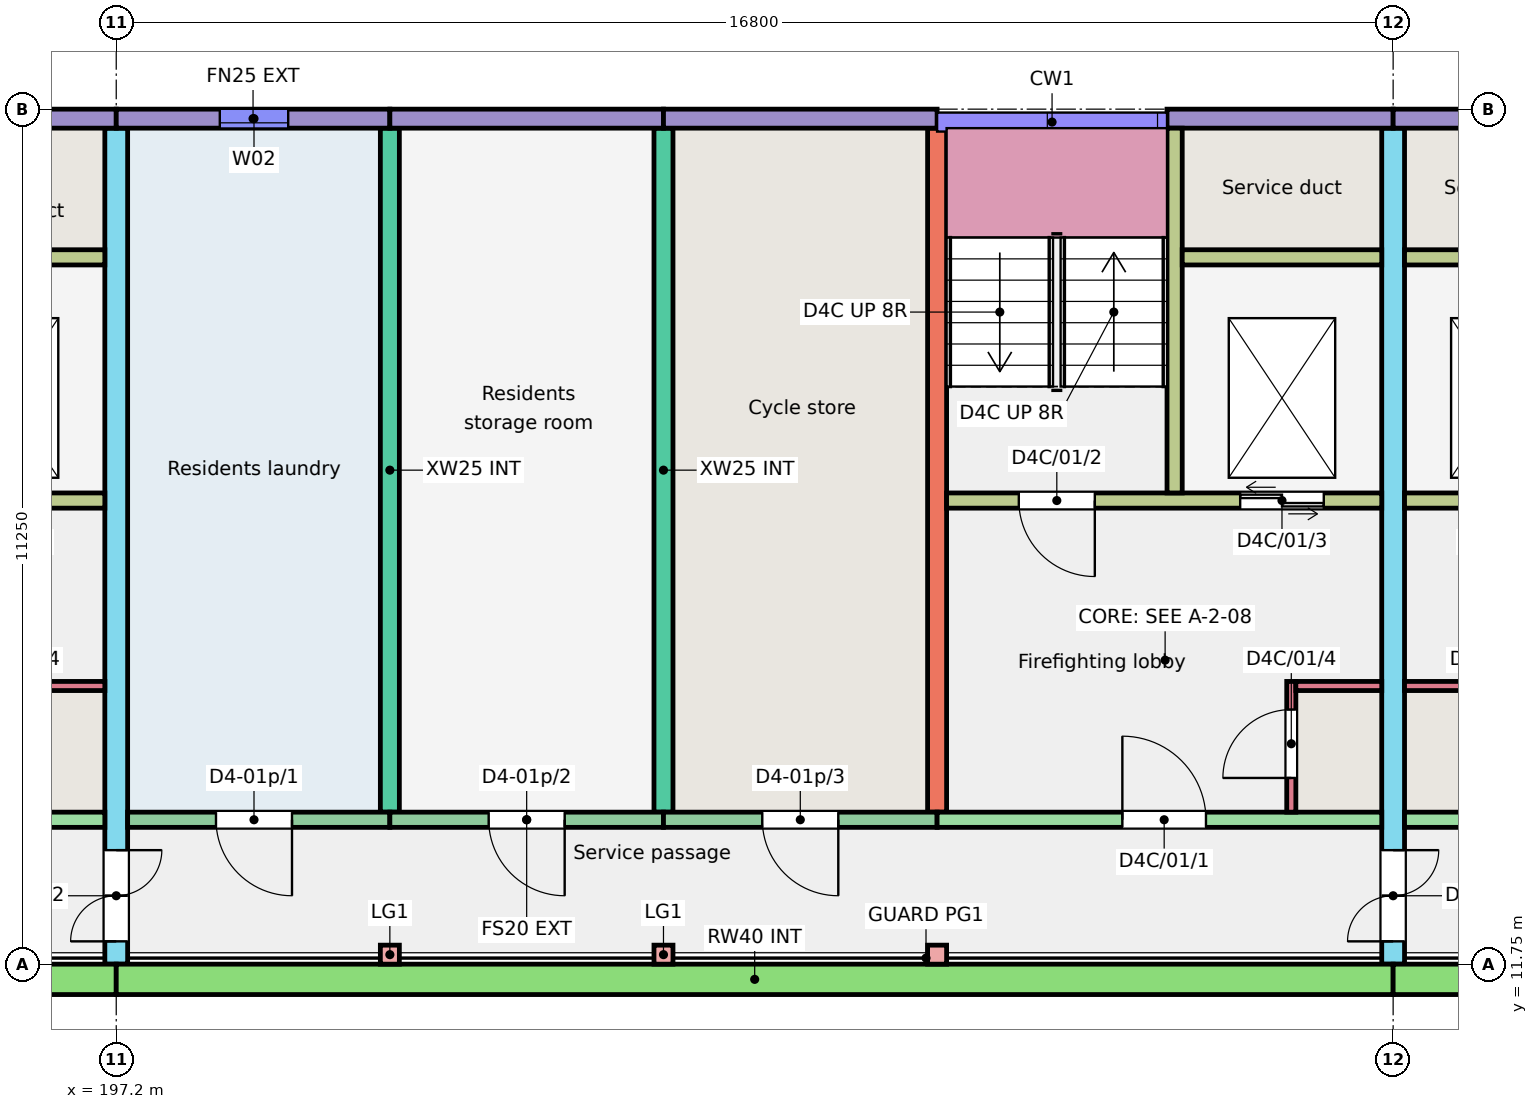
"""IFC4 building model, lengths in metres.
Left out: names, types, materials, properties, quantities, classifications, styles, units other than length and angle.
Written with IfcOpenShell. Run it as: python <this file> out.ifc"""

import sys

from ifc_helpers import new_model, si_unit, direction, frame, frame_2d, origin, origin_2d, place, context, subcontext, project, spatial, rectangle, extrude, element, fill, save


model = new_model("IFC4")
c1 = context("Model", 3, precision=1e-05, world=origin(), true_north=direction((0.0, 1.0)))
c2 = subcontext(c1, "Body", "Model", "MODEL_VIEW")
j1 = project(units=[si_unit("LENGTHUNIT", "METRE"), si_unit("PLANEANGLEUNIT", "RADIAN")], contexts=[c1])
p1 = place(None, origin())
s1 = spatial("IfcSite", under=j1, at=p1, CompositionType="ELEMENT")
p2 = place(p1, origin())
s2 = spatial("IfcBuilding", under=s1, at=p2, CompositionType="ELEMENT")
p3 = place(p2, frame((0.0, 0.0, 3.0)))
s3 = spatial("IfcBuildingStorey", under=s2, at=p3, CompositionType="ELEMENT", Elevation=3.0)
p4 = place(p3, frame((197.2, 11.75, 0.0), z_axis=(0.0, 0.0, 1.0), x_axis=(0.0, 1.0, 0.0)))
e1 = element("IfcWall", 1, at=p4, inside=s3, PredefinedType="SHEAR", context=c2, shape_type="SweptSolid", body=[
    extrude(rectangle(XDim=11.0, YDim=0.3, at=frame_2d((5.5, 0.0))), origin(), (0.0, 0.0, 1.0), 3.0),
])
p5 = place(p4, frame((0.3, 0.0, 0.0)))
e2 = element("IfcOpeningElement", 2, at=p5, cuts=e1, PredefinedType="OPENING", context=c2, shape_type="SweptSolid", body=[
    extrude(rectangle(XDim=1.2, YDim=2.1, at=frame_2d((0.6, 1.05))), frame((0.0, 0.16, 0.0), z_axis=(0.0, -1.0, 0.0), x_axis=(1.0, 0.0, 0.0)), (0.0, 0.0, 1.0), 0.32),
])
for number, where, z_axis, x_axis in (
    (3, (200.8, 13.75, 0.0), (0.0, 0.0, 1.0), (0.0, 1.0, 0.0)),
    (4, (204.4, 13.75, 0.0), (0.0, 0.0, 1.0), (0.0, 1.0, 0.0)),
    (5, (208.0, 13.75, 0.0), (0.0, 0.0, 1.0), (0.0, 1.0, 0.0)),
):
    element("IfcWall", number, at=place(p3, frame(where, z_axis=z_axis, x_axis=x_axis)), inside=s3, PredefinedType="SHEAR", context=c2, shape_type="SweptSolid", body=[
        extrude(rectangle(XDim=9.0, YDim=0.25, at=frame_2d((4.5, 0.0))), origin(), (0.0, 0.0, 1.0), 3.0),
    ])
p6 = place(p3, frame((214.0, 11.75, 0.0), z_axis=(0.0, 0.0, 1.0), x_axis=(0.0, 1.0, 0.0)))
e6 = element("IfcWall", 6, at=p6, inside=s3, PredefinedType="SHEAR", context=c2, shape_type="SweptSolid", body=[
    extrude(rectangle(XDim=11.0, YDim=0.3, at=frame_2d((5.5, 0.0))), origin(), (0.0, 0.0, 1.0), 3.0),
])
p7 = place(p6, frame((0.3, 0.0, 0.0)))
e7 = element("IfcOpeningElement", 7, at=p7, cuts=e6, PredefinedType="OPENING", context=c2, shape_type="SweptSolid", body=[
    extrude(rectangle(XDim=1.2, YDim=2.1, at=frame_2d((0.6, 1.05))), frame((0.0, 0.16, 0.0), z_axis=(0.0, -1.0, 0.0), x_axis=(1.0, 0.0, 0.0)), (0.0, 0.0, 1.0), 0.32),
])
p8 = place(p3, frame((194.225, 22.875, 0.0), z_axis=(0.0, 0.0, 1.0), x_axis=(1.0, 0.0, 0.0)))
e8 = element("IfcWall", 8, at=p8, inside=s3, PredefinedType="SOLIDWALL", context=c2, shape_type="SweptSolid", body=[
    extrude(rectangle(XDim=2.975, YDim=0.25, at=frame_2d((1.487, 0.0))), origin(), (0.0, 0.0, 1.0), 3.0),
])
p9 = place(p3, frame((191.2, 13.65, 0.0), z_axis=(0.0, 0.0, 1.0), x_axis=(1.0, 0.0, 0.0)))
e9 = element("IfcWall", 9, at=p9, inside=s3, PredefinedType="SHEAR", context=c2, shape_type="SweptSolid", body=[
    extrude(rectangle(XDim=5.85, YDim=0.2, at=frame_2d((2.925, 0.0))), origin(), (0.0, 0.0, 1.0), 3.0),
])
p10 = place(p9, frame((2.438, 0.0, 0.0)))
e10 = element("IfcOpeningElement", 10, at=p10, cuts=e9, PredefinedType="OPENING", context=c2, shape_type="SweptSolid", body=[
    extrude(rectangle(XDim=1.1, YDim=2.1, at=frame_2d((0.55, 1.05))), frame((0.0, 0.11, 0.0), z_axis=(0.0, -1.0, 0.0), x_axis=(1.0, 0.0, 0.0)), (0.0, 0.0, 1.0), 0.22),
])
p11 = place(p3, frame((191.325, 17.85, 0.0), z_axis=(0.0, 0.0, 1.0), x_axis=(1.0, 0.0, 0.0)))
e11 = element("IfcWall", 11, at=p11, inside=s3, PredefinedType="SHEAR", context=c2, shape_type="SweptSolid", body=[
    extrude(rectangle(XDim=5.725, YDim=0.2, at=frame_2d((2.863, 0.0))), origin(), (0.0, 0.0, 1.0), 3.0),
])
p12 = place(p11, frame((0.95, 0.0, 0.0)))
e12 = element("IfcOpeningElement", 12, at=p12, cuts=e11, PredefinedType="OPENING", context=c2, shape_type="SweptSolid", body=[
    extrude(rectangle(XDim=1.0, YDim=2.1, at=frame_2d((0.5, 1.05))), frame((0.0, 0.11, 0.0), z_axis=(0.0, -1.0, 0.0), x_axis=(1.0, 0.0, 0.0)), (0.0, 0.0, 1.0), 0.22),
])
p13 = place(p11, frame((3.863, 0.0, 0.0)))
e13 = element("IfcOpeningElement", 13, at=p13, cuts=e11, PredefinedType="OPENING", context=c2, shape_type="SweptSolid", body=[
    extrude(rectangle(XDim=1.1, YDim=2.1, at=frame_2d((0.55, 1.05))), frame((0.0, 0.11, 0.0), z_axis=(0.0, -1.0, 0.0), x_axis=(1.0, 0.0, 0.0)), (0.0, 0.0, 1.0), 0.22),
])
p14 = place(p3, frame((194.425, 21.05, 0.0), z_axis=(0.0, 0.0, 1.0), x_axis=(1.0, 0.0, 0.0)))
e14 = element("IfcWall", 14, at=p14, inside=s3, PredefinedType="SHEAR", context=c2, shape_type="SweptSolid", body=[
    extrude(rectangle(XDim=2.625, YDim=0.2, at=frame_2d((1.312, 0.0))), origin(), (0.0, 0.0, 1.0), 3.0),
])
p15 = place(p3, frame((195.92, 15.41, 0.0), z_axis=(0.0, 0.0, 1.0), x_axis=(1.0, 0.0, 0.0)))
e15 = element("IfcWall", 15, at=p15, inside=s3, PredefinedType="SHEAR", context=c2, shape_type="SweptSolid", body=[
    extrude(rectangle(XDim=1.13, YDim=0.12, at=frame_2d((0.565, 0.0))), origin(), (0.0, 0.0, 1.0), 3.0),
])
p16 = place(p3, frame((197.2, 22.875, 0.0), z_axis=(0.0, 0.0, 1.0), x_axis=(1.0, 0.0, 0.0)))
e16 = element("IfcWall", 16, at=p16, inside=s3, PredefinedType="SOLIDWALL", context=c2, shape_type="SweptSolid", body=[
    extrude(rectangle(XDim=3.6, YDim=0.25, at=frame_2d((1.8, 0.0))), origin(), (0.0, 0.0, 1.0), 3.0),
])
p17 = place(p16, frame((1.363, 0.0, 1.8)))
e17 = element("IfcOpeningElement", 17, at=p17, cuts=e16, PredefinedType="OPENING", context=c2, shape_type="SweptSolid", body=[
    extrude(rectangle(XDim=0.9, YDim=0.6, at=frame_2d((0.45, 0.3))), frame((0.0, 0.135, 0.0), z_axis=(0.0, -1.0, 0.0), x_axis=(1.0, 0.0, 0.0)), (0.0, 0.0, 1.0), 0.27),
])
p18 = place(p3, frame((197.35, 13.65, 0.0), z_axis=(0.0, 0.0, 1.0), x_axis=(1.0, 0.0, 0.0)))
e18 = element("IfcWall", 18, at=p18, inside=s3, PredefinedType="SOLIDWALL", context=c2, shape_type="SweptSolid", body=[
    extrude(rectangle(XDim=3.45, YDim=0.2, at=frame_2d((1.725, 0.0))), origin(), (0.0, 0.0, 1.0), 3.0),
])
p19 = place(p18, frame((1.163, 0.0, 0.0)))
e19 = element("IfcOpeningElement", 19, at=p19, cuts=e18, PredefinedType="OPENING", context=c2, shape_type="SweptSolid", body=[
    extrude(rectangle(XDim=1.0, YDim=2.1, at=frame_2d((0.5, 1.05))), frame((0.0, 0.11, 0.0), z_axis=(0.0, -1.0, 0.0), x_axis=(1.0, 0.0, 0.0)), (0.0, 0.0, 1.0), 0.22),
])
p20 = place(p3, frame((200.8, 22.875, 0.0), z_axis=(0.0, 0.0, 1.0), x_axis=(1.0, 0.0, 0.0)))
e20 = element("IfcWall", 20, at=p20, inside=s3, PredefinedType="SOLIDWALL", context=c2, shape_type="SweptSolid", body=[
    extrude(rectangle(XDim=3.6, YDim=0.25, at=frame_2d((1.8, 0.0))), origin(), (0.0, 0.0, 1.0), 3.0),
])
p21 = place(p3, frame((200.8, 13.65, 0.0), z_axis=(0.0, 0.0, 1.0), x_axis=(1.0, 0.0, 0.0)))
e21 = element("IfcWall", 21, at=p21, inside=s3, PredefinedType="SOLIDWALL", context=c2, shape_type="SweptSolid", body=[
    extrude(rectangle(XDim=3.6, YDim=0.2, at=frame_2d((1.8, 0.0))), origin(), (0.0, 0.0, 1.0), 3.0),
])
p22 = place(p21, frame((1.3, 0.0, 0.0)))
e22 = element("IfcOpeningElement", 22, at=p22, cuts=e21, PredefinedType="OPENING", context=c2, shape_type="SweptSolid", body=[
    extrude(rectangle(XDim=1.0, YDim=2.1, at=frame_2d((0.5, 1.05))), frame((0.0, 0.11, 0.0), z_axis=(0.0, -1.0, 0.0), x_axis=(1.0, 0.0, 0.0)), (0.0, 0.0, 1.0), 0.22),
])
p23 = place(p3, frame((204.4, 22.875, 0.0), z_axis=(0.0, 0.0, 1.0), x_axis=(1.0, 0.0, 0.0)))
e23 = element("IfcWall", 23, at=p23, inside=s3, PredefinedType="SOLIDWALL", context=c2, shape_type="SweptSolid", body=[
    extrude(rectangle(XDim=3.6, YDim=0.25, at=frame_2d((1.8, 0.0))), origin(), (0.0, 0.0, 1.0), 3.0),
])
p24 = place(p3, frame((204.4, 13.65, 0.0), z_axis=(0.0, 0.0, 1.0), x_axis=(1.0, 0.0, 0.0)))
e24 = element("IfcWall", 24, at=p24, inside=s3, PredefinedType="SOLIDWALL", context=c2, shape_type="SweptSolid", body=[
    extrude(rectangle(XDim=3.6, YDim=0.2, at=frame_2d((1.8, 0.0))), origin(), (0.0, 0.0, 1.0), 3.0),
])
p25 = place(p24, frame((1.3, 0.0, 0.0)))
e25 = element("IfcOpeningElement", 25, at=p25, cuts=e24, PredefinedType="OPENING", context=c2, shape_type="SweptSolid", body=[
    extrude(rectangle(XDim=1.0, YDim=2.1, at=frame_2d((0.5, 1.05))), frame((0.0, 0.11, 0.0), z_axis=(0.0, -1.0, 0.0), x_axis=(1.0, 0.0, 0.0)), (0.0, 0.0, 1.0), 0.22),
])
p26 = place(p3, frame((211.025, 22.875, 0.0), z_axis=(0.0, 0.0, 1.0), x_axis=(1.0, 0.0, 0.0)))
e26 = element("IfcWall", 26, at=p26, inside=s3, PredefinedType="SOLIDWALL", context=c2, shape_type="SweptSolid", body=[
    extrude(rectangle(XDim=2.975, YDim=0.25, at=frame_2d((1.488, 0.0))), origin(), (0.0, 0.0, 1.0), 3.0),
])
p27 = place(p3, frame((208.0, 13.65, 0.0), z_axis=(0.0, 0.0, 1.0), x_axis=(1.0, 0.0, 0.0)))
e27 = element("IfcWall", 27, at=p27, inside=s3, PredefinedType="SHEAR", context=c2, shape_type="SweptSolid", body=[
    extrude(rectangle(XDim=5.85, YDim=0.2, at=frame_2d((2.925, 0.0))), origin(), (0.0, 0.0, 1.0), 3.0),
])
p28 = place(p27, frame((2.438, 0.0, 0.0)))
e28 = element("IfcOpeningElement", 28, at=p28, cuts=e27, PredefinedType="OPENING", context=c2, shape_type="SweptSolid", body=[
    extrude(rectangle(XDim=1.1, YDim=2.1, at=frame_2d((0.55, 1.05))), frame((0.0, 0.11, 0.0), z_axis=(0.0, -1.0, 0.0), x_axis=(1.0, 0.0, 0.0)), (0.0, 0.0, 1.0), 0.22),
])
p29 = place(p3, frame((208.125, 17.85, 0.0), z_axis=(0.0, 0.0, 1.0), x_axis=(1.0, 0.0, 0.0)))
e29 = element("IfcWall", 29, at=p29, inside=s3, PredefinedType="SHEAR", context=c2, shape_type="SweptSolid", body=[
    extrude(rectangle(XDim=5.725, YDim=0.2, at=frame_2d((2.863, 0.0))), origin(), (0.0, 0.0, 1.0), 3.0),
])
p30 = place(p29, frame((0.95, 0.0, 0.0)))
e30 = element("IfcOpeningElement", 30, at=p30, cuts=e29, PredefinedType="OPENING", context=c2, shape_type="SweptSolid", body=[
    extrude(rectangle(XDim=1.0, YDim=2.1, at=frame_2d((0.5, 1.05))), frame((0.0, 0.11, 0.0), z_axis=(0.0, -1.0, 0.0), x_axis=(1.0, 0.0, 0.0)), (0.0, 0.0, 1.0), 0.22),
])
p31 = place(p29, frame((3.863, 0.0, 0.0)))
e31 = element("IfcOpeningElement", 31, at=p31, cuts=e29, PredefinedType="OPENING", context=c2, shape_type="SweptSolid", body=[
    extrude(rectangle(XDim=1.1, YDim=2.1, at=frame_2d((0.55, 1.05))), frame((0.0, 0.11, 0.0), z_axis=(0.0, -1.0, 0.0), x_axis=(1.0, 0.0, 0.0)), (0.0, 0.0, 1.0), 0.22),
])
p32 = place(p3, frame((211.125, 17.95, 0.0), z_axis=(0.0, 0.0, 1.0), x_axis=(0.0, 1.0, 0.0)))
e32 = element("IfcWall", 32, at=p32, inside=s3, PredefinedType="SHEAR", context=c2, shape_type="SweptSolid", body=[
    extrude(rectangle(XDim=4.8, YDim=0.2, at=frame_2d((2.4, 0.0))), origin(), (0.0, 0.0, 1.0), 3.0),
])
p33 = place(p3, frame((211.225, 21.05, 0.0), z_axis=(0.0, 0.0, 1.0), x_axis=(1.0, 0.0, 0.0)))
e33 = element("IfcWall", 33, at=p33, inside=s3, PredefinedType="SHEAR", context=c2, shape_type="SweptSolid", body=[
    extrude(rectangle(XDim=2.625, YDim=0.2, at=frame_2d((1.312, 0.0))), origin(), (0.0, 0.0, 1.0), 3.0),
])
p34 = place(p3, frame((212.66, 13.75, 0.0), z_axis=(0.0, 0.0, 1.0), x_axis=(0.0, 1.0, 0.0)))
e34 = element("IfcWall", 34, at=p34, inside=s3, PredefinedType="SHEAR", context=c2, shape_type="SweptSolid", body=[
    extrude(rectangle(XDim=1.72, YDim=0.12, at=frame_2d((0.86, 0.0))), origin(), (0.0, 0.0, 1.0), 3.0),
])
p35 = place(p34, frame((0.45, 0.0, 0.0)))
e35 = element("IfcOpeningElement", 35, at=p35, cuts=e34, PredefinedType="OPENING", context=c2, shape_type="SweptSolid", body=[
    extrude(rectangle(XDim=0.9, YDim=2.1, at=frame_2d((0.45, 1.05))), frame((0.0, 0.07, 0.0), z_axis=(0.0, -1.0, 0.0), x_axis=(1.0, 0.0, 0.0)), (0.0, 0.0, 1.0), 0.14),
])
p36 = place(p3, frame((212.72, 15.41, 0.0), z_axis=(0.0, 0.0, 1.0), x_axis=(1.0, 0.0, 0.0)))
e36 = element("IfcWall", 36, at=p36, inside=s3, PredefinedType="SHEAR", context=c2, shape_type="SweptSolid", body=[
    extrude(rectangle(XDim=1.13, YDim=0.12, at=frame_2d((0.565, 0.0))), origin(), (0.0, 0.0, 1.0), 3.0),
])
p37 = place(p3, frame((214.0, 22.875, 0.0), z_axis=(0.0, 0.0, 1.0), x_axis=(1.0, 0.0, 0.0)))
e37 = element("IfcWall", 37, at=p37, inside=s3, PredefinedType="SOLIDWALL", context=c2, shape_type="SweptSolid", body=[
    extrude(rectangle(XDim=2.975, YDim=0.25, at=frame_2d((1.488, 0.0))), origin(), (0.0, 0.0, 1.0), 3.0),
])
p38 = place(p3, frame((214.15, 13.65, 0.0), z_axis=(0.0, 0.0, 1.0), x_axis=(1.0, 0.0, 0.0)))
e38 = element("IfcWall", 38, at=p38, inside=s3, PredefinedType="SHEAR", context=c2, shape_type="SweptSolid", body=[
    extrude(rectangle(XDim=5.85, YDim=0.2, at=frame_2d((2.925, 0.0))), origin(), (0.0, 0.0, 1.0), 3.0),
])
p39 = place(p38, frame((2.312, 0.0, 0.0)))
e39 = element("IfcOpeningElement", 39, at=p39, cuts=e38, PredefinedType="OPENING", context=c2, shape_type="SweptSolid", body=[
    extrude(rectangle(XDim=1.1, YDim=2.1, at=frame_2d((0.55, 1.05))), frame((0.0, 0.11, 0.0), z_axis=(0.0, -1.0, 0.0), x_axis=(1.0, 0.0, 0.0)), (0.0, 0.0, 1.0), 0.22),
])
p40 = place(p3, frame((214.15, 17.85, 0.0), z_axis=(0.0, 0.0, 1.0), x_axis=(1.0, 0.0, 0.0)))
e40 = element("IfcWall", 40, at=p40, inside=s3, PredefinedType="SHEAR", context=c2, shape_type="SweptSolid", body=[
    extrude(rectangle(XDim=5.725, YDim=0.2, at=frame_2d((2.863, 0.0))), origin(), (0.0, 0.0, 1.0), 3.0),
])
p41 = place(p40, frame((3.775, 0.0, 0.0)))
e41 = element("IfcOpeningElement", 41, at=p41, cuts=e40, PredefinedType="OPENING", context=c2, shape_type="SweptSolid", body=[
    extrude(rectangle(XDim=1.0, YDim=2.1, at=frame_2d((0.5, 1.05))), frame((0.0, 0.11, 0.0), z_axis=(0.0, -1.0, 0.0), x_axis=(1.0, 0.0, 0.0)), (0.0, 0.0, 1.0), 0.22),
])
p42 = place(p40, frame((0.762, 0.0, 0.0)))
e42 = element("IfcOpeningElement", 42, at=p42, cuts=e40, PredefinedType="OPENING", context=c2, shape_type="SweptSolid", body=[
    extrude(rectangle(XDim=1.1, YDim=2.1, at=frame_2d((0.55, 1.05))), frame((0.0, 0.11, 0.0), z_axis=(0.0, -1.0, 0.0), x_axis=(1.0, 0.0, 0.0)), (0.0, 0.0, 1.0), 0.22),
])
p43 = place(p3, frame((214.15, 21.05, 0.0), z_axis=(0.0, 0.0, 1.0), x_axis=(1.0, 0.0, 0.0)))
e43 = element("IfcWall", 43, at=p43, inside=s3, PredefinedType="SHEAR", context=c2, shape_type="SweptSolid", body=[
    extrude(rectangle(XDim=2.625, YDim=0.2, at=frame_2d((1.312, 0.0))), origin(), (0.0, 0.0, 1.0), 3.0),
])
p44 = place(p3, frame((214.15, 15.41, 0.0), z_axis=(0.0, 0.0, 1.0), x_axis=(1.0, 0.0, 0.0)))
e44 = element("IfcWall", 44, at=p44, inside=s3, PredefinedType="SHEAR", context=c2, shape_type="SweptSolid", body=[
    extrude(rectangle(XDim=1.13, YDim=0.12, at=frame_2d((0.565, 0.0))), origin(), (0.0, 0.0, 1.0), 3.0),
])
for number, where, z_axis, x_axis in (
    (45, (200.8, 11.875, 0.0), (0.0, 0.0, 1.0), (1.0, 0.0, 0.0)),
    (46, (204.4, 11.875, 0.0), (0.0, 0.0, 1.0), (1.0, 0.0, 0.0)),
    (47, (208.0, 11.875, 0.0), (0.0, 0.0, 1.0), (1.0, 0.0, 0.0)),
):
    element("IfcColumn", number, at=place(p3, frame(where, z_axis=z_axis, x_axis=x_axis)), inside=s3, PredefinedType="COLUMN", context=c2, shape_type="SweptSolid", body=[
        extrude(rectangle(XDim=0.25, YDim=0.25, at=origin_2d()), origin(), (0.0, 0.0, 1.0), 3.0),
    ])
for number, where, z_axis, x_axis in (
    (48, (180.4, 11.55, 0.0), (0.0, 0.0, 1.0), (1.0, 0.0, 0.0)),
    (49, (197.2, 11.55, 0.0), (0.0, 0.0, 1.0), (1.0, 0.0, 0.0)),
    (50, (214.0, 11.55, 0.0), (0.0, 0.0, 1.0), (1.0, 0.0, 0.0)),
):
    element("IfcWall", number, at=place(p3, frame(where, z_axis=z_axis, x_axis=x_axis)), inside=s3, PredefinedType="SOLIDWALL", context=c2, shape_type="SweptSolid", body=[
        extrude(rectangle(XDim=16.8, YDim=0.4, at=frame_2d((8.4, 0.0))), origin(), (0.0, 0.0, 1.0), 2.85),
    ])
p45 = place(p17, origin())
e51 = element("IfcWindow", 51, at=p45, inside=s3, PartitioningType="SINGLE_PANEL", PredefinedType="WINDOW", context=c2, shape_type="SweptSolid", body=[
    extrude(rectangle(XDim=0.9, YDim=0.6, at=frame_2d((0.45, 0.3))), frame((0.0, -0.025, 0.0), z_axis=(0.0, -1.0, 0.0), x_axis=(1.0, 0.0, 0.0)), (0.0, 0.0, 1.0), 0.06),
])
fill(e17, e51)
p46 = place(p19, origin())
e52 = element("IfcDoor", 52, at=p46, inside=s3, OperationType="SINGLE_SWING_RIGHT", PredefinedType="DOOR", context=c2, shape_type="SweptSolid", body=[
    extrude(rectangle(XDim=1.0, YDim=2.1, at=frame_2d((0.5, 1.05))), frame((0.0, 0.025, 0.0), z_axis=(0.0, -1.0, 0.0), x_axis=(1.0, 0.0, 0.0)), (0.0, 0.0, 1.0), 0.05),
])
fill(e19, e52)
p47 = place(p22, origin())
e53 = element("IfcDoor", 53, at=p47, inside=s3, OperationType="SINGLE_SWING_RIGHT", PredefinedType="DOOR", context=c2, shape_type="SweptSolid", body=[
    extrude(rectangle(XDim=1.0, YDim=2.1, at=frame_2d((0.5, 1.05))), frame((0.0, 0.025, 0.0), z_axis=(0.0, -1.0, 0.0), x_axis=(1.0, 0.0, 0.0)), (0.0, 0.0, 1.0), 0.05),
])
fill(e22, e53)
p48 = place(p25, origin())
e54 = element("IfcDoor", 54, at=p48, inside=s3, OperationType="SINGLE_SWING_RIGHT", PredefinedType="DOOR", context=c2, shape_type="SweptSolid", body=[
    extrude(rectangle(XDim=1.0, YDim=2.1, at=frame_2d((0.5, 1.05))), frame((0.0, 0.025, 0.0), z_axis=(0.0, -1.0, 0.0), x_axis=(1.0, 0.0, 0.0)), (0.0, 0.0, 1.0), 0.05),
])
fill(e25, e54)
p49 = place(p28, origin())
e55 = element("IfcDoor", 55, at=p49, inside=s3, OperationType="SINGLE_SWING_LEFT", PredefinedType="DOOR", context=c2, shape_type="SweptSolid", body=[
    extrude(rectangle(XDim=1.1, YDim=2.1, at=frame_2d((0.55, 1.05))), frame((0.0, 0.025, 0.0), z_axis=(0.0, -1.0, 0.0), x_axis=(1.0, 0.0, 0.0)), (0.0, 0.0, 1.0), 0.05),
])
fill(e28, e55)
p50 = place(p30, origin())
e56 = element("IfcDoor", 56, at=p50, inside=s3, OperationType="SINGLE_SWING_RIGHT", PredefinedType="DOOR", context=c2, shape_type="SweptSolid", body=[
    extrude(rectangle(XDim=1.0, YDim=2.1, at=frame_2d((0.5, 1.05))), frame((0.0, 0.025, 0.0), z_axis=(0.0, -1.0, 0.0), x_axis=(1.0, 0.0, 0.0)), (0.0, 0.0, 1.0), 0.05),
])
fill(e30, e56)
p51 = place(p31, origin())
e57 = element("IfcDoor", 57, at=p51, inside=s3, OperationType="DOUBLE_DOOR_SLIDING", PredefinedType="DOOR", context=c2, shape_type="SweptSolid", body=[
    extrude(rectangle(XDim=1.1, YDim=2.1, at=frame_2d((0.55, 1.05))), frame((0.0, 0.025, 0.0), z_axis=(0.0, -1.0, 0.0), x_axis=(1.0, 0.0, 0.0)), (0.0, 0.0, 1.0), 0.05),
])
fill(e31, e57)
p52 = place(p35, origin())
e58 = element("IfcDoor", 58, at=p52, inside=s3, OperationType="SINGLE_SWING_LEFT", PredefinedType="DOOR", context=c2, shape_type="SweptSolid", body=[
    extrude(rectangle(XDim=0.9, YDim=2.1, at=frame_2d((0.45, 1.05))), frame((0.0, 0.025, 0.0), z_axis=(0.0, -1.0, 0.0), x_axis=(1.0, 0.0, 0.0)), (0.0, 0.0, 1.0), 0.05),
])
fill(e35, e58)
p53 = place(p5, origin())
e59 = element("IfcDoor", 59, at=p53, inside=s3, OperationType="DOUBLE_DOOR_SINGLE_SWING", PredefinedType="DOOR", context=c2, shape_type="SweptSolid", body=[
    extrude(rectangle(XDim=1.2, YDim=2.1, at=frame_2d((0.6, 1.05))), frame((0.0, 0.025, 0.0), z_axis=(0.0, -1.0, 0.0), x_axis=(1.0, 0.0, 0.0)), (0.0, 0.0, 1.0), 0.05),
])
fill(e2, e59)
p54 = place(p7, origin())
e60 = element("IfcDoor", 60, at=p54, inside=s3, OperationType="DOUBLE_DOOR_SINGLE_SWING", PredefinedType="DOOR", context=c2, shape_type="SweptSolid", body=[
    extrude(rectangle(XDim=1.2, YDim=2.1, at=frame_2d((0.6, 1.05))), frame((0.0, 0.025, 0.0), z_axis=(0.0, -1.0, 0.0), x_axis=(1.0, 0.0, 0.0)), (0.0, 0.0, 1.0), 0.05),
])
fill(e7, e60)
save(model, sys.argv[1])
